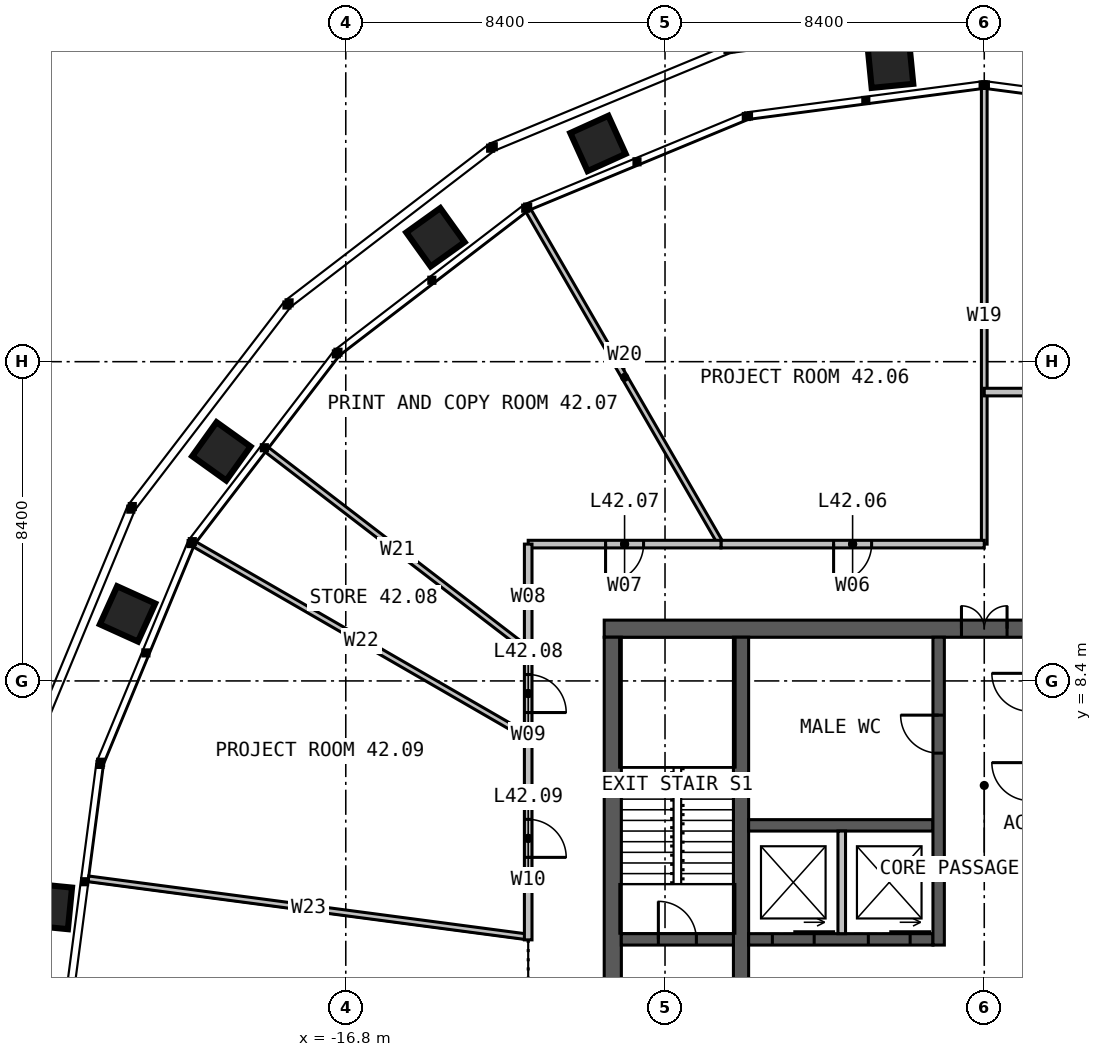
"""IFC4 building model, lengths in metres.
Left out: names, types, materials, properties, quantities, classifications, styles, units other than length and angle.
Written with IfcOpenShell. Run it as: python <this file> out.ifc"""

import sys

from ifc_helpers import new_model, si_unit, direction, frame, frame_2d, origin, place, context, subcontext, project, spatial, rectangle, extrude, element, fill, save


model = new_model("IFC4")
c1 = context("Model", 3, precision=1e-05, world=origin(), true_north=direction((0.0, 1.0)))
c2 = subcontext(c1, "Body", "Model", "MODEL_VIEW")
j1 = project(units=[si_unit("LENGTHUNIT", "METRE"), si_unit("PLANEANGLEUNIT", "RADIAN")], contexts=[c1])
p1 = place(None, origin())
s1 = spatial("IfcSite", under=j1, at=p1, CompositionType="ELEMENT")
p2 = place(p1, origin())
s2 = spatial("IfcBuilding", under=s1, at=p2, CompositionType="ELEMENT")
p3 = place(p2, frame((0.0, 0.0, 175.0)))
s3 = spatial("IfcBuildingStorey", under=s2, at=p3, CompositionType="ELEMENT", Elevation=175.0)
p4 = place(p3, frame((-10.0, 9.775, 0.0), z_axis=(0.0, 0.0, 1.0), x_axis=(1.0, 0.0, 0.0)))
e1 = element("IfcWall", 1, at=p4, inside=s3, PredefinedType="SOLIDWALL", context=c2, shape_type="SweptSolid", body=[
    extrude(rectangle(XDim=20.0, YDim=0.45, at=frame_2d((10.0, 0.0))), origin(), (0.0, 0.0, 1.0), 4.0),
])
p5 = place(p4, frame((9.4, 0.0, 0.0)))
e2 = element("IfcOpeningElement", 2, at=p5, cuts=e1, PredefinedType="OPENING", context=c2, shape_type="SweptSolid", body=[
    extrude(rectangle(XDim=1.2, YDim=2.2, at=frame_2d((0.6, 1.1))), frame((0.0, 0.235, 0.0), z_axis=(0.0, -1.0, 0.0), x_axis=(1.0, 0.0, 0.0)), (0.0, 0.0, 1.0), 0.47),
])
p6 = place(p3, frame((-9.775, 9.55, 0.0), z_axis=(0.0, 0.0, 1.0), x_axis=(0.0, -1.0, 0.0)))
e3 = element("IfcWall", 3, at=p6, inside=s3, PredefinedType="SOLIDWALL", context=c2, shape_type="SweptSolid", body=[
    extrude(rectangle(XDim=19.1, YDim=0.45, at=frame_2d((9.55, 0.0))), origin(), (0.0, 0.0, 1.0), 4.0),
])
p7 = place(p3, frame((-6.4, -9.55, 0.0), z_axis=(0.0, 0.0, 1.0), x_axis=(0.0, 1.0, 0.0)))
e4 = element("IfcWall", 4, at=p7, inside=s3, PredefinedType="SOLIDWALL", context=c2, shape_type="SweptSolid", body=[
    extrude(rectangle(XDim=19.1, YDim=0.4, at=frame_2d((9.55, 0.0))), origin(), (0.0, 0.0, 1.0), 4.0),
])
p8 = place(p7, frame((9.05, 0.0, 0.0)))
e5 = element("IfcOpeningElement", 5, at=p8, cuts=e4, PredefinedType="OPENING", context=c2, shape_type="SweptSolid", body=[
    extrude(rectangle(XDim=1.0, YDim=2.2, at=frame_2d((0.5, 1.1))), frame((0.0, 0.21, 0.0), z_axis=(0.0, -1.0, 0.0), x_axis=(1.0, 0.0, 0.0)), (0.0, 0.0, 1.0), 0.42),
])
p9 = place(p3, frame((-6.2, 1.6, 0.0), z_axis=(0.0, 0.0, 1.0), x_axis=(1.0, 0.0, 0.0)))
e6 = element("IfcWall", 6, at=p9, inside=s3, PredefinedType="SOLIDWALL", context=c2, shape_type="SweptSolid", body=[
    extrude(rectangle(XDim=4.85, YDim=0.3, at=frame_2d((2.425, 0.0))), origin(), (0.0, 0.0, 1.0), 4.0),
])
p10 = place(p9, frame((0.625, 0.0, 0.0)))
e7 = element("IfcOpeningElement", 7, at=p10, cuts=e6, PredefinedType="OPENING", context=c2, shape_type="SweptSolid", body=[
    extrude(rectangle(XDim=1.1, YDim=2.2, at=frame_2d((0.55, 1.1))), frame((0.0, 0.16, 0.0), z_axis=(0.0, -1.0, 0.0), x_axis=(1.0, 0.0, 0.0)), (0.0, 0.0, 1.0), 0.32),
])
p11 = place(p9, frame((3.15, 0.0, 0.0)))
e8 = element("IfcOpeningElement", 8, at=p11, cuts=e6, PredefinedType="OPENING", context=c2, shape_type="SweptSolid", body=[
    extrude(rectangle(XDim=1.1, YDim=2.2, at=frame_2d((0.55, 1.1))), frame((0.0, 0.16, 0.0), z_axis=(0.0, -1.0, 0.0), x_axis=(1.0, 0.0, 0.0)), (0.0, 0.0, 1.0), 0.32),
])
p12 = place(p3, frame((-6.2, 4.6, 0.0), z_axis=(0.0, 0.0, 1.0), x_axis=(1.0, 0.0, 0.0)))
e9 = element("IfcWall", 9, at=p12, inside=s3, PredefinedType="SOLIDWALL", context=c2, shape_type="SweptSolid", body=[
    extrude(rectangle(XDim=4.85, YDim=0.3, at=frame_2d((2.425, 0.0))), origin(), (0.0, 0.0, 1.0), 4.0),
])
p13 = place(p3, frame((-1.2, 1.45, 0.0), z_axis=(0.0, 0.0, 1.0), x_axis=(0.0, 1.0, 0.0)))
e10 = element("IfcWall", 10, at=p13, inside=s3, PredefinedType="SOLIDWALL", context=c2, shape_type="SweptSolid", body=[
    extrude(rectangle(XDim=8.1, YDim=0.3, at=frame_2d((4.05, 0.0))), origin(), (0.0, 0.0, 1.0), 4.0),
])
p14 = place(p13, frame((5.05, 0.0, 0.0)))
e11 = element("IfcOpeningElement", 11, at=p14, cuts=e10, PredefinedType="OPENING", context=c2, shape_type="SweptSolid", body=[
    extrude(rectangle(XDim=1.0, YDim=2.2, at=frame_2d((0.5, 1.1))), frame((0.0, 0.16, 0.0), z_axis=(0.0, -1.0, 0.0), x_axis=(1.0, 0.0, 0.0)), (0.0, 0.0, 1.0), 0.32),
])
p15 = place(p3, frame((-9.55, 1.6, 0.0), z_axis=(0.0, 0.0, 1.0), x_axis=(1.0, 0.0, 0.0)))
e12 = element("IfcWall", 12, at=p15, inside=s3, PredefinedType="SOLIDWALL", context=c2, shape_type="SweptSolid", body=[
    extrude(rectangle(XDim=2.95, YDim=0.3, at=frame_2d((1.475, 0.0))), origin(), (0.0, 0.0, 1.0), 4.0),
])
p16 = place(p15, frame((0.975, 0.0, 0.0)))
e13 = element("IfcOpeningElement", 13, at=p16, cuts=e12, PredefinedType="OPENING", context=c2, shape_type="SweptSolid", body=[
    extrude(rectangle(XDim=1.0, YDim=2.2, at=frame_2d((0.5, 1.1))), frame((0.0, 0.16, 0.0), z_axis=(0.0, -1.0, 0.0), x_axis=(1.0, 0.0, 0.0)), (0.0, 0.0, 1.0), 0.32),
])
p17 = place(p3, frame((-3.75, 1.75, 0.0), z_axis=(0.0, 0.0, 1.0), x_axis=(0.0, 1.0, 0.0)))
e14 = element("IfcWall", 14, at=p17, inside=s3, PredefinedType="SOLIDWALL", context=c2, shape_type="SweptSolid", body=[
    extrude(rectangle(XDim=2.7, YDim=0.2, at=frame_2d((1.35, 0.0))), origin(), (0.0, 0.0, 1.0), 3.75),
])
p18 = place(p3, frame((0.0, 12.0, 0.0), z_axis=(0.0, 0.0, 1.0), x_axis=(0.0, 1.0, 0.0)))
e15 = element("IfcWall", 15, at=p18, inside=s3, PredefinedType="PARTITIONING", context=c2, shape_type="SweptSolid", body=[
    extrude(rectangle(XDim=11.992, YDim=0.15, at=frame_2d((5.996, 0.0))), origin(), (0.0, 0.0, 1.0), 2.79),
])
p19 = place(p3, frame((-6.928, 12.0, 0.0), z_axis=(0.0, 0.0, 1.0), x_axis=(-0.49999906822, 0.866025941747, 0.0)))
e16 = element("IfcWall", 16, at=p19, inside=s3, PredefinedType="PARTITIONING", context=c2, shape_type="SweptSolid", body=[
    extrude(rectangle(XDim=10.136, YDim=0.15, at=frame_2d((5.068, 0.0))), origin(), (0.0, 0.0, 1.0), 2.79),
])
p20 = place(p3, frame((-12.0, 9.208, 0.0), z_axis=(0.0, 0.0, 1.0), x_axis=(-0.793369477609, 0.60874039787, 0.0)))
e17 = element("IfcWall", 17, at=p20, inside=s3, PredefinedType="PARTITIONING", context=c2, shape_type="SweptSolid", body=[
    extrude(rectangle(XDim=8.661, YDim=0.15, at=frame_2d((4.331, 0.0))), origin(), (0.0, 0.0, 1.0), 2.79),
])
p21 = place(p3, frame((-12.0, 6.928, 0.0), z_axis=(0.0, 0.0, 1.0), x_axis=(-0.866025941747, 0.49999906822, 0.0)))
e18 = element("IfcWall", 18, at=p21, inside=s3, PredefinedType="PARTITIONING", context=c2, shape_type="SweptSolid", body=[
    extrude(rectangle(XDim=10.136, YDim=0.15, at=frame_2d((5.068, 0.0))), origin(), (0.0, 0.0, 1.0), 2.79),
])
p22 = place(p3, frame((-11.99, 1.661, 0.0), z_axis=(0.0, 0.0, 1.0), x_axis=(-0.991369870096, 0.131094548571, 0.0)))
e19 = element("IfcWall", 19, at=p22, inside=s3, PredefinedType="PARTITIONING", context=c2, shape_type="SweptSolid", body=[
    extrude(rectangle(XDim=11.682, YDim=0.15, at=frame_2d((5.841, 0.0))), origin(), (0.0, 0.0, 1.0), 2.79),
])
p23 = place(p3, frame((9.238, 16.0, 0.0), z_axis=(0.0, 0.0, 1.0), x_axis=(-1.0, 0.0, 0.0)))
e20 = element("IfcWall", 20, at=p23, inside=s3, PredefinedType="PARTITIONING", context=c2, shape_type="SweptSolid", body=[
    extrude(rectangle(XDim=9.238, YDim=0.2, at=frame_2d((4.619, 0.0))), origin(), (0.0, 0.0, 1.0), 3.8),
])
p24 = place(p23, frame((3.719, 0.0, 0.0)))
e21 = element("IfcOpeningElement", 21, at=p24, cuts=e20, PredefinedType="OPENING", context=c2, shape_type="SweptSolid", body=[
    extrude(rectangle(XDim=1.8, YDim=2.2, at=frame_2d((0.9, 1.1))), frame((0.0, 0.11, 0.0), z_axis=(0.0, -1.0, 0.0), x_axis=(1.0, 0.0, 0.0)), (0.0, 0.0, 1.0), 0.22),
])
p25 = place(p3, frame((0.0, 12.0, 0.0), z_axis=(0.0, 0.0, 1.0), x_axis=(-1.0, 0.0, 0.0)))
e22 = element("IfcWall", 22, at=p25, inside=s3, PredefinedType="PARTITIONING", context=c2, shape_type="SweptSolid", body=[
    extrude(rectangle(XDim=6.928, YDim=0.2, at=frame_2d((3.464, 0.0))), origin(), (0.0, 0.0, 1.0), 3.8),
])
p26 = place(p25, frame((2.964, 0.0, 0.0)))
e23 = element("IfcOpeningElement", 23, at=p26, cuts=e22, PredefinedType="OPENING", context=c2, shape_type="SweptSolid", body=[
    extrude(rectangle(XDim=1.0, YDim=2.2, at=frame_2d((0.5, 1.1))), frame((0.0, 0.11, 0.0), z_axis=(0.0, -1.0, 0.0), x_axis=(1.0, 0.0, 0.0)), (0.0, 0.0, 1.0), 0.22),
])
p27 = place(p3, frame((-6.928, 12.0, 0.0), z_axis=(0.0, 0.0, 1.0), x_axis=(-1.0, 0.0, 0.0)))
e24 = element("IfcWall", 24, at=p27, inside=s3, PredefinedType="PARTITIONING", context=c2, shape_type="SweptSolid", body=[
    extrude(rectangle(XDim=5.072, YDim=0.2, at=frame_2d((2.536, 0.0))), origin(), (0.0, 0.0, 1.0), 3.8),
])
p28 = place(p27, frame((2.036, 0.0, 0.0)))
e25 = element("IfcOpeningElement", 25, at=p28, cuts=e24, PredefinedType="OPENING", context=c2, shape_type="SweptSolid", body=[
    extrude(rectangle(XDim=1.0, YDim=2.2, at=frame_2d((0.5, 1.1))), frame((0.0, 0.11, 0.0), z_axis=(0.0, -1.0, 0.0), x_axis=(1.0, 0.0, 0.0)), (0.0, 0.0, 1.0), 0.22),
])
p29 = place(p3, frame((-12.0, 12.0, 0.0), z_axis=(0.0, 0.0, 1.0), x_axis=(0.0, -1.0, 0.0)))
e26 = element("IfcWall", 26, at=p29, inside=s3, PredefinedType="PARTITIONING", context=c2, shape_type="SweptSolid", body=[
    extrude(rectangle(XDim=2.792, YDim=0.2, at=frame_2d((1.396, 0.0))), origin(), (0.0, 0.0, 1.0), 3.8),
])
p30 = place(p3, frame((-12.0, 9.208, 0.0), z_axis=(0.0, 0.0, 1.0), x_axis=(0.0, -1.0, 0.0)))
e27 = element("IfcWall", 27, at=p30, inside=s3, PredefinedType="PARTITIONING", context=c2, shape_type="SweptSolid", body=[
    extrude(rectangle(XDim=2.28, YDim=0.2, at=frame_2d((1.14, 0.0))), origin(), (0.0, 0.0, 1.0), 3.8),
])
p31 = place(p30, frame((0.64, 0.0, 0.0)))
e28 = element("IfcOpeningElement", 28, at=p31, cuts=e27, PredefinedType="OPENING", context=c2, shape_type="SweptSolid", body=[
    extrude(rectangle(XDim=1.0, YDim=2.2, at=frame_2d((0.5, 1.1))), frame((0.0, 0.11, 0.0), z_axis=(0.0, -1.0, 0.0), x_axis=(1.0, 0.0, 0.0)), (0.0, 0.0, 1.0), 0.22),
])
p32 = place(p3, frame((-12.0, 6.928, 0.0), z_axis=(0.0, 0.0, 1.0), x_axis=(0.0, -1.0, 0.0)))
e29 = element("IfcWall", 29, at=p32, inside=s3, PredefinedType="PARTITIONING", context=c2, shape_type="SweptSolid", body=[
    extrude(rectangle(XDim=5.342, YDim=0.2, at=frame_2d((2.671, 0.0))), origin(), (0.0, 0.0, 1.0), 3.8),
])
p33 = place(p32, frame((2.171, 0.0, 0.0)))
e30 = element("IfcOpeningElement", 30, at=p33, cuts=e29, PredefinedType="OPENING", context=c2, shape_type="SweptSolid", body=[
    extrude(rectangle(XDim=1.0, YDim=2.2, at=frame_2d((0.5, 1.1))), frame((0.0, 0.11, 0.0), z_axis=(0.0, -1.0, 0.0), x_axis=(1.0, 0.0, 0.0)), (0.0, 0.0, 1.0), 0.22),
])
p34 = place(p5, origin())
e31 = element("IfcDoor", 31, at=p34, inside=s3, OperationType="DOUBLE_DOOR_SINGLE_SWING", PredefinedType="DOOR", context=c2, shape_type="SweptSolid", body=[
    extrude(rectangle(XDim=1.2, YDim=2.2, at=frame_2d((0.6, 1.1))), frame((0.0, 0.025, 0.0), z_axis=(0.0, -1.0, 0.0), x_axis=(1.0, 0.0, 0.0)), (0.0, 0.0, 1.0), 0.05),
])
fill(e2, e31)
p35 = place(p16, origin())
e32 = element("IfcDoor", 32, at=p35, inside=s3, OperationType="SINGLE_SWING_LEFT", PredefinedType="DOOR", context=c2, shape_type="SweptSolid", body=[
    extrude(rectangle(XDim=1.0, YDim=2.2, at=frame_2d((0.5, 1.1))), frame((0.0, 0.025, 0.0), z_axis=(0.0, -1.0, 0.0), x_axis=(1.0, 0.0, 0.0)), (0.0, 0.0, 1.0), 0.05),
])
fill(e13, e32)
p36 = place(p14, origin())
e33 = element("IfcDoor", 33, at=p36, inside=s3, OperationType="SINGLE_SWING_RIGHT", PredefinedType="DOOR", context=c2, shape_type="SweptSolid", body=[
    extrude(rectangle(XDim=1.0, YDim=2.2, at=frame_2d((0.5, 1.1))), frame((0.0, 0.025, 0.0), z_axis=(0.0, -1.0, 0.0), x_axis=(1.0, 0.0, 0.0)), (0.0, 0.0, 1.0), 0.05),
])
fill(e11, e33)
p37 = place(p10, origin())
e34 = element("IfcDoor", 34, at=p37, inside=s3, OperationType="SLIDING_TO_LEFT", PredefinedType="DOOR", context=c2, shape_type="SweptSolid", body=[
    extrude(rectangle(XDim=1.1, YDim=2.2, at=frame_2d((0.55, 1.1))), frame((0.0, 0.025, 0.0), z_axis=(0.0, -1.0, 0.0), x_axis=(1.0, 0.0, 0.0)), (0.0, 0.0, 1.0), 0.05),
])
fill(e7, e34)
p38 = place(p11, origin())
e35 = element("IfcDoor", 35, at=p38, inside=s3, OperationType="SLIDING_TO_LEFT", PredefinedType="DOOR", context=c2, shape_type="SweptSolid", body=[
    extrude(rectangle(XDim=1.1, YDim=2.2, at=frame_2d((0.55, 1.1))), frame((0.0, 0.025, 0.0), z_axis=(0.0, -1.0, 0.0), x_axis=(1.0, 0.0, 0.0)), (0.0, 0.0, 1.0), 0.05),
])
fill(e8, e35)
p39 = place(p26, origin())
e36 = element("IfcDoor", 36, at=p39, inside=s3, OperationType="SINGLE_SWING_RIGHT", PredefinedType="DOOR", context=c2, shape_type="SweptSolid", body=[
    extrude(rectangle(XDim=1.0, YDim=2.2, at=frame_2d((0.5, 1.1))), frame((0.0, 0.025, 0.0), z_axis=(0.0, -1.0, 0.0), x_axis=(1.0, 0.0, 0.0)), (0.0, 0.0, 1.0), 0.05),
])
fill(e23, e36)
p40 = place(p28, origin())
e37 = element("IfcDoor", 37, at=p40, inside=s3, OperationType="SINGLE_SWING_RIGHT", PredefinedType="DOOR", context=c2, shape_type="SweptSolid", body=[
    extrude(rectangle(XDim=1.0, YDim=2.2, at=frame_2d((0.5, 1.1))), frame((0.0, 0.025, 0.0), z_axis=(0.0, -1.0, 0.0), x_axis=(1.0, 0.0, 0.0)), (0.0, 0.0, 1.0), 0.05),
])
fill(e25, e37)
p41 = place(p31, origin())
e38 = element("IfcDoor", 38, at=p41, inside=s3, OperationType="SINGLE_SWING_RIGHT", PredefinedType="DOOR", context=c2, shape_type="SweptSolid", body=[
    extrude(rectangle(XDim=1.0, YDim=2.2, at=frame_2d((0.5, 1.1))), frame((0.0, 0.025, 0.0), z_axis=(0.0, -1.0, 0.0), x_axis=(1.0, 0.0, 0.0)), (0.0, 0.0, 1.0), 0.05),
])
fill(e28, e38)
p42 = place(p33, origin())
e39 = element("IfcDoor", 39, at=p42, inside=s3, OperationType="SINGLE_SWING_RIGHT", PredefinedType="DOOR", context=c2, shape_type="SweptSolid", body=[
    extrude(rectangle(XDim=1.0, YDim=2.2, at=frame_2d((0.5, 1.1))), frame((0.0, 0.025, 0.0), z_axis=(0.0, -1.0, 0.0), x_axis=(1.0, 0.0, 0.0)), (0.0, 0.0, 1.0), 0.05),
])
fill(e30, e39)
save(model, sys.argv[1])
